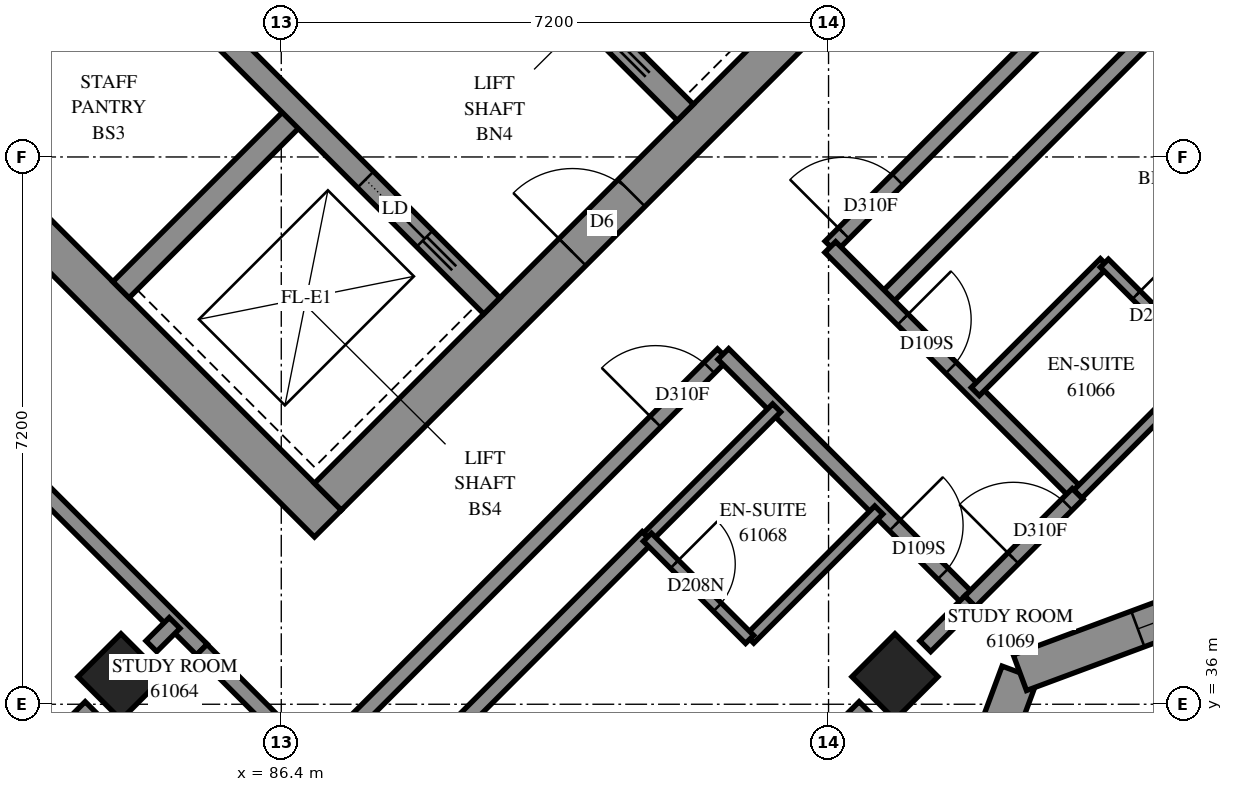
"""IFC4 building model, lengths in metres.
Left out: names, types, materials, properties, quantities, classifications, styles, units other than length and angle.
Written with IfcOpenShell. Run it as: python <this file> out.ifc"""

import sys

from ifc_helpers import new_model, si_unit, direction, frame, frame_2d, origin, origin_2d, place, context, subcontext, project, spatial, polyline, rectangle, outline, extrude, element, fill, save


model = new_model("IFC4")
c1 = context("Model", 3, precision=1e-05, world=origin(), true_north=direction((0.0, 1.0)))
c2 = subcontext(c1, "Body", "Model", "MODEL_VIEW")
j1 = project(units=[si_unit("LENGTHUNIT", "METRE"), si_unit("PLANEANGLEUNIT", "RADIAN")], contexts=[c1])
p1 = place(None, origin())
s1 = spatial("IfcSite", under=j1, at=p1, CompositionType="ELEMENT")
p2 = place(p1, origin())
s2 = spatial("IfcBuilding", under=s1, at=p2, CompositionType="ELEMENT")
p3 = place(p2, frame((0.0, 0.0, 223.6)))
s3 = spatial("IfcBuildingStorey", under=s2, at=p3, CompositionType="ELEMENT", Elevation=223.6)
for number, where, z_axis, x_axis in (
    (1, (84.291, 36.362, 0.0), (0.0, 0.0, 1.0), (0.707, -0.707, 0.0)),
    (2, (94.474, 36.362, 0.0), (0.0, 0.0, 1.0), (0.707, -0.707, 0.0)),
):
    element("IfcColumn", number, at=place(p3, frame(where, z_axis=z_axis, x_axis=x_axis)), inside=s3, PredefinedType="COLUMN", context=c2, shape_type="SweptSolid", body=[
        extrude(rectangle(XDim=0.8, YDim=0.8, at=origin_2d()), origin(), (0.0, 0.0, 1.0), 3.1),
    ])
p4 = place(p3, frame((76.124, 49.267, -0.3), z_axis=(0.0, 0.0, 1.0), x_axis=(0.7071067812, -0.7071067812, 0.0)))
e3 = element("IfcWall", 3, at=p4, inside=s3, PredefinedType="SHEAR", context=c2, shape_type="SweptSolid", body=[
    extrude(rectangle(XDim=15.4, YDim=0.5, at=frame_2d((7.7, 0.0))), origin(), (0.0, 0.0, 1.0), 2.7),
])
p5 = place(p3, frame((87.013, 38.731, -0.3), z_axis=(0.0, 0.0, 1.0), x_axis=(0.7071067812, 0.7071067812, 0.0)))
e4 = element("IfcWall", 4, at=p5, inside=s3, PredefinedType="SHEAR", context=c2, shape_type="SweptSolid", body=[
    extrude(rectangle(XDim=14.4, YDim=0.5, at=frame_2d((7.2, 0.0))), origin(), (0.0, 0.0, 1.0), 2.7),
])
p6 = place(p5, frame((4.55, 0.0, 0.3)))
e5 = element("IfcOpeningElement", 5, at=p6, cuts=e4, PredefinedType="OPENING", context=c2, shape_type="SweptSolid", body=[
    extrude(rectangle(XDim=1.1, YDim=2.1, at=frame_2d((0.55, 1.05))), frame((0.0, 0.26, 0.0), z_axis=(0.0, -1.0, 0.0), x_axis=(1.0, 0.0, 0.0)), (0.0, 0.0, 1.0), 0.52),
])
p7 = place(p5, frame((11.35, 0.0, 0.3)))
e6 = element("IfcOpeningElement", 6, at=p7, cuts=e4, PredefinedType="OPENING", context=c2, shape_type="SweptSolid", body=[
    extrude(rectangle(XDim=1.1, YDim=2.1, at=frame_2d((0.55, 1.05))), frame((0.0, 0.26, 0.0), z_axis=(0.0, -1.0, 0.0), x_axis=(1.0, 0.0, 0.0)), (0.0, 0.0, 1.0), 0.52),
])
for number, where, z_axis, x_axis in (
    (7, (81.746, 43.999, 0.0), (0.0, 0.0, 1.0), (0.707, 0.707, 0.0)),
    (8, (84.291, 41.453, 0.0), (0.0, 0.0, 1.0), (0.707, 0.707, 0.0)),
):
    element("IfcWall", number, at=place(p3, frame(where, z_axis=z_axis, x_axis=x_axis)), inside=s3, PredefinedType="SOLIDWALL", context=c2, shape_type="SweptSolid", body=[
        extrude(rectangle(XDim=3.3, YDim=0.3, at=frame_2d((1.65, 0.0))), origin(), (0.0, 0.0, 1.0), 3.1),
    ])
p8 = place(p3, frame((78.988, 51.423, 0.0), z_axis=(0.0, 0.0, 1.0), x_axis=(0.7071067812, -0.7071067812, 0.0)))
e9 = element("IfcWall", 9, at=p8, inside=s3, PredefinedType="SOLIDWALL", context=c2, shape_type="SweptSolid", body=[
    extrude(rectangle(XDim=14.4, YDim=0.3, at=frame_2d((7.2, 0.0))), origin(), (0.0, 0.0, 1.0), 3.1),
])
p9 = place(p8, frame((1.35, 0.0, 0.0)))
e10 = element("IfcOpeningElement", 10, at=p9, cuts=e9, PredefinedType="OPENING", context=c2, shape_type="SweptSolid", body=[
    extrude(rectangle(XDim=0.9, YDim=2.1, at=frame_2d((0.45, 1.05))), frame((0.0, 0.16, 0.0), z_axis=(0.0, -1.0, 0.0), x_axis=(1.0, 0.0, 0.0)), (0.0, 0.0, 1.0), 0.32),
])
p10 = place(p8, frame((4.95, 0.0, 0.0)))
e11 = element("IfcOpeningElement", 11, at=p10, cuts=e9, PredefinedType="OPENING", context=c2, shape_type="SweptSolid", body=[
    extrude(rectangle(XDim=0.9, YDim=2.1, at=frame_2d((0.45, 1.05))), frame((0.0, 0.16, 0.0), z_axis=(0.0, -1.0, 0.0), x_axis=(1.0, 0.0, 0.0)), (0.0, 0.0, 1.0), 0.32),
])
p11 = place(p8, frame((8.55, 0.0, 0.0)))
e12 = element("IfcOpeningElement", 12, at=p11, cuts=e9, PredefinedType="OPENING", context=c2, shape_type="SweptSolid", body=[
    extrude(rectangle(XDim=0.9, YDim=2.1, at=frame_2d((0.45, 1.05))), frame((0.0, 0.16, 0.0), z_axis=(0.0, -1.0, 0.0), x_axis=(1.0, 0.0, 0.0)), (0.0, 0.0, 1.0), 0.32),
])
p12 = place(p8, frame((12.05, 0.0, 0.0)))
e13 = element("IfcOpeningElement", 13, at=p12, cuts=e9, PredefinedType="OPENING", context=c2, shape_type="SweptSolid", body=[
    extrude(rectangle(XDim=1.1, YDim=2.1, at=frame_2d((0.55, 1.05))), frame((0.0, 0.16, 0.0), z_axis=(0.0, -1.0, 0.0), x_axis=(1.0, 0.0, 0.0)), (0.0, 0.0, 1.0), 0.32),
])
p13 = place(p3, frame((81.534, 53.969, 0.0), z_axis=(0.0, 0.0, 1.0), x_axis=(0.707103309, -0.7071102534, 0.0)))
e14 = element("IfcWall", 14, at=p13, inside=s3, PredefinedType="SOLIDWALL", context=c2, shape_type="SweptSolid", body=[
    extrude(rectangle(XDim=14.4, YDim=0.3, at=frame_2d((7.2, 0.0))), origin(), (0.0, 0.0, 1.0), 3.1),
])
p14 = place(p13, frame((1.25, 0.0, 0.0)))
e15 = element("IfcOpeningElement", 15, at=p14, cuts=e14, PredefinedType="OPENING", context=c2, shape_type="SweptSolid", body=[
    extrude(rectangle(XDim=1.1, YDim=2.1, at=frame_2d((0.55, 1.05))), frame((0.0, 0.16, 0.0), z_axis=(0.0, -1.0, 0.0), x_axis=(1.0, 0.0, 0.0)), (0.0, 0.0, 1.0), 0.32),
])
p15 = place(p13, frame((4.85, 0.0, 0.0)))
e16 = element("IfcOpeningElement", 16, at=p15, cuts=e14, PredefinedType="OPENING", context=c2, shape_type="SweptSolid", body=[
    extrude(rectangle(XDim=1.1, YDim=2.1, at=frame_2d((0.55, 1.05))), frame((0.0, 0.16, 0.0), z_axis=(0.0, -1.0, 0.0), x_axis=(1.0, 0.0, 0.0)), (0.0, 0.0, 1.0), 0.32),
])
p16 = place(p13, frame((8.45, 0.0, 0.0)))
e17 = element("IfcOpeningElement", 17, at=p16, cuts=e14, PredefinedType="OPENING", context=c2, shape_type="SweptSolid", body=[
    extrude(rectangle(XDim=1.1, YDim=2.1, at=frame_2d((0.55, 1.05))), frame((0.0, 0.16, 0.0), z_axis=(0.0, -1.0, 0.0), x_axis=(1.0, 0.0, 0.0)), (0.0, 0.0, 1.0), 0.32),
])
p17 = place(p13, frame((12.05, 0.0, 0.0)))
e18 = element("IfcOpeningElement", 18, at=p17, cuts=e14, PredefinedType="OPENING", context=c2, shape_type="SweptSolid", body=[
    extrude(rectangle(XDim=1.1, YDim=2.1, at=frame_2d((0.55, 1.05))), frame((0.0, 0.16, 0.0), z_axis=(0.0, -1.0, 0.0), x_axis=(1.0, 0.0, 0.0)), (0.0, 0.0, 1.0), 0.32),
])
p18 = place(p3, frame((94.281, 31.47, 0.0), z_axis=(0.0, 0.0, 1.0), x_axis=(0.3481903374, 0.9374238577, 0.0)))
e19 = element("IfcWall", 19, at=p18, inside=s3, PredefinedType="SOLIDWALL", context=c2, shape_type="SweptSolid", body=[
    extrude(outline(polyline([(-0.12, -0.25), (5.16, -0.25), (5.39, 0.25), (0.12, 0.25), (-0.12, -0.25)])), origin(), (0.0, 0.0, 1.0), 3.1),
])
p19 = place(p18, frame((1.512, 0.0, 0.45)))
e20 = element("IfcOpeningElement", 20, at=p19, cuts=e19, PredefinedType="OPENING", context=c2, shape_type="SweptSolid", body=[
    extrude(rectangle(XDim=1.3, YDim=2.5, at=frame_2d((0.65, 1.25))), frame((0.0, 0.26, 0.0), z_axis=(0.0, -1.0, 0.0), x_axis=(1.0, 0.0, 0.0)), (0.0, 0.0, 1.0), 0.52),
])
p20 = place(p18, frame((3.012, 0.0, 0.45)))
e21 = element("IfcOpeningElement", 21, at=p20, cuts=e19, PredefinedType="OPENING", context=c2, shape_type="SweptSolid", body=[
    extrude(rectangle(XDim=1.3, YDim=2.5, at=frame_2d((0.65, 1.25))), frame((0.0, 0.26, 0.0), z_axis=(0.0, -1.0, 0.0), x_axis=(1.0, 0.0, 0.0)), (0.0, 0.0, 1.0), 0.52),
])
p21 = place(p3, frame((96.118, 36.415, 0.0), z_axis=(0.0, 0.0, 1.0), x_axis=(0.9374238577, 0.3481903374, 0.0)))
e22 = element("IfcWall", 22, at=p21, inside=s3, PredefinedType="SOLIDWALL", context=c2, shape_type="SweptSolid", body=[
    extrude(outline(polyline([(0.115, -0.25), (5.395, -0.25), (5.155, 0.25), (-0.115, 0.25), (0.115, -0.25)])), origin(), (0.0, 0.0, 1.0), 3.1),
])
p22 = place(p21, frame((1.655, 0.0, 0.45)))
e23 = element("IfcOpeningElement", 23, at=p22, cuts=e22, PredefinedType="OPENING", context=c2, shape_type="SweptSolid", body=[
    extrude(rectangle(XDim=1.3, YDim=2.5, at=frame_2d((0.65, 1.25))), frame((0.0, 0.26, 0.0), z_axis=(0.0, -1.0, 0.0), x_axis=(1.0, 0.0, 0.0)), (0.0, 0.0, 1.0), 0.52),
])
p23 = place(p21, frame((3.155, 0.0, 0.45)))
e24 = element("IfcOpeningElement", 24, at=p23, cuts=e22, PredefinedType="OPENING", context=c2, shape_type="SweptSolid", body=[
    extrude(rectangle(XDim=1.3, YDim=2.5, at=frame_2d((0.65, 1.25))), frame((0.0, 0.26, 0.0), z_axis=(0.0, -1.0, 0.0), x_axis=(1.0, 0.0, 0.0)), (0.0, 0.0, 1.0), 0.52),
])
p24 = place(p3, frame((79.476, 36.495, 0.0), z_axis=(0.0, 0.0, 1.0), x_axis=(0.9612862254, -0.2755517971, 0.0)))
e25 = element("IfcWall", 25, at=p24, inside=s3, PredefinedType="SOLIDWALL", context=c2, shape_type="SweptSolid", body=[
    extrude(outline(polyline([(-0.145, -0.25), (4.392, -0.25), (4.67, 0.25), (0.145, 0.25), (-0.145, -0.25)])), origin(), (0.0, 0.0, 1.0), 3.1),
])
p25 = place(p24, frame((0.501, 0.0, 0.45)))
e26 = element("IfcOpeningElement", 26, at=p25, cuts=e25, PredefinedType="OPENING", context=c2, shape_type="SweptSolid", body=[
    extrude(rectangle(XDim=1.3, YDim=2.5, at=frame_2d((0.65, 1.25))), frame((0.0, 0.26, 0.0), z_axis=(0.0, -1.0, 0.0), x_axis=(1.0, 0.0, 0.0)), (0.0, 0.0, 1.0), 0.52),
])
p26 = place(p24, frame((2.002, 0.0, 0.45)))
e27 = element("IfcOpeningElement", 27, at=p26, cuts=e25, PredefinedType="OPENING", context=c2, shape_type="SweptSolid", body=[
    extrude(rectangle(XDim=1.3, YDim=2.5, at=frame_2d((0.65, 1.25))), frame((0.0, 0.26, 0.0), z_axis=(0.0, -1.0, 0.0), x_axis=(1.0, 0.0, 0.0)), (0.0, 0.0, 1.0), 0.52),
])
p27 = place(p3, frame((93.625, 42.021, 0.0), z_axis=(0.0, 0.0, 1.0), x_axis=(0.7071067812, 0.7071067812, 0.0)))
e28 = element("IfcWall", 28, at=p27, inside=s3, PredefinedType="PARTITIONING", context=c2, shape_type="SweptSolid", body=[
    extrude(rectangle(XDim=9.998, YDim=0.2, at=frame_2d((4.999, 0.0))), origin(), (0.0, 0.0, 1.0), 3.1),
])
p28 = place(p27, frame((0.248, 0.0, 0.0)))
e29 = element("IfcOpeningElement", 29, at=p28, cuts=e28, PredefinedType="OPENING", context=c2, shape_type="SweptSolid", body=[
    extrude(rectangle(XDim=1.0, YDim=2.1, at=frame_2d((0.5, 1.05))), frame((0.0, 0.11, 0.0), z_axis=(0.0, -1.0, 0.0), x_axis=(1.0, 0.0, 0.0)), (0.0, 0.0, 1.0), 0.22),
])
p29 = place(p3, frame((85.021, 32.002, 0.0), z_axis=(0.0, 0.0, 1.0), x_axis=(0.7071010771, 0.7071124852, 0.0)))
e30 = element("IfcWall", 30, at=p29, inside=s3, PredefinedType="PARTITIONING", context=c2, shape_type="SweptSolid", body=[
    extrude(rectangle(XDim=8.766, YDim=0.2, at=frame_2d((4.383, 0.0))), origin(), (0.0, 0.0, 1.0), 3.1),
])
p30 = place(p3, frame((86.835, 35.231, 0.0), z_axis=(0.0, 0.0, 1.0), x_axis=(0.7071067812, 0.7071067812, 0.0)))
e31 = element("IfcWall", 31, at=p30, inside=s3, PredefinedType="PARTITIONING", context=c2, shape_type="SweptSolid", body=[
    extrude(rectangle(XDim=7.6, YDim=0.2, at=frame_2d((3.8, 0.0))), origin(), (0.0, 0.0, 1.0), 3.1),
])
p31 = place(p30, frame((6.346, 0.0, 0.0)))
e32 = element("IfcOpeningElement", 32, at=p31, cuts=e31, PredefinedType="OPENING", context=c2, shape_type="SweptSolid", body=[
    extrude(rectangle(XDim=1.0, YDim=2.1, at=frame_2d((0.5, 1.05))), frame((0.0, 0.11, 0.0), z_axis=(0.0, -1.0, 0.0), x_axis=(1.0, 0.0, 0.0)), (0.0, 0.0, 1.0), 0.22),
])
p32 = place(p3, frame((94.331, 41.313, 0.0), z_axis=(0.0, 0.0, 1.0), x_axis=(0.7072516979, 0.7069618347, 0.0)))
e33 = element("IfcWall", 33, at=p32, inside=s3, PredefinedType="PARTITIONING", context=c2, shape_type="SweptSolid", body=[
    extrude(rectangle(XDim=6.9, YDim=0.2, at=frame_2d((3.45, 0.0))), origin(), (0.0, 0.0, 1.0), 3.1),
])
p33 = place(p3, frame((80.522, 41.553, 0.0), z_axis=(0.0, 0.0, 1.0), x_axis=(0.7071067812, -0.7071067812, 0.0)))
e34 = element("IfcWall", 34, at=p33, inside=s3, PredefinedType="PARTITIONING", context=c2, shape_type="SweptSolid", body=[
    extrude(rectangle(XDim=6.836, YDim=0.2, at=frame_2d((3.418, 0.0))), origin(), (0.0, 0.0, 1.0), 3.1),
])
p34 = place(p3, frame((89.781, 31.671, 0.0), z_axis=(0.0, 0.0, 1.0), x_axis=(0.7071067812, 0.7071067812, 0.0)))
e35 = element("IfcWall", 35, at=p34, inside=s3, PredefinedType="PARTITIONING", context=c2, shape_type="SweptSolid", body=[
    extrude(rectangle(XDim=6.07, YDim=0.2, at=frame_2d((3.035, 0.0))), origin(), (0.0, 0.0, 1.0), 2.6),
])
p35 = place(p3, frame((93.623, 42.015, 0.0), z_axis=(0.0, 0.0, 1.0), x_axis=(0.7071067812, -0.7071067812, 0.0)))
e36 = element("IfcWall", 36, at=p35, inside=s3, PredefinedType="PARTITIONING", context=c2, shape_type="SweptSolid", body=[
    extrude(rectangle(XDim=4.599, YDim=0.2, at=frame_2d((2.3, 0.0))), origin(), (0.0, 0.0, 1.0), 3.1),
])
p36 = place(p35, frame((1.349, 0.0, 0.0)))
e37 = element("IfcOpeningElement", 37, at=p36, cuts=e36, PredefinedType="OPENING", context=c2, shape_type="SweptSolid", body=[
    extrude(rectangle(XDim=0.9, YDim=2.1, at=frame_2d((0.45, 1.05))), frame((0.0, 0.11, 0.0), z_axis=(0.0, -1.0, 0.0), x_axis=(1.0, 0.0, 0.0)), (0.0, 0.0, 1.0), 0.22),
])
p37 = place(p3, frame((92.216, 40.608, 0.0), z_axis=(0.0, 0.0, 1.0), x_axis=(0.7071067812, -0.7071067812, 0.0)))
e38 = element("IfcWall", 38, at=p37, inside=s3, PredefinedType="PARTITIONING", context=c2, shape_type="SweptSolid", body=[
    extrude(rectangle(XDim=4.599, YDim=0.2, at=frame_2d((2.3, 0.0))), origin(), (0.0, 0.0, 1.0), 3.1),
])
p38 = place(p37, frame((3.189, 0.0, 0.0)))
e39 = element("IfcOpeningElement", 39, at=p38, cuts=e38, PredefinedType="OPENING", context=c2, shape_type="SweptSolid", body=[
    extrude(rectangle(XDim=0.9, YDim=2.1, at=frame_2d((0.45, 1.05))), frame((0.0, 0.11, 0.0), z_axis=(0.0, -1.0, 0.0), x_axis=(1.0, 0.0, 0.0)), (0.0, 0.0, 1.0), 0.22),
])
for number, where, z_axis, x_axis in (
    (40, (92.563, 36.857, 0.0), (0.0, 0.0, 1.0), (0.707, 0.707, 0.0)),
    (41, (91.219, 38.201, 0.0), (0.0, 0.0, 1.0), (0.707, 0.707, 0.0)),
):
    element("IfcWall", number, at=place(p3, frame(where, z_axis=z_axis, x_axis=x_axis)), inside=s3, PredefinedType="PARTITIONING", context=c2, shape_type="SweptSolid", body=[
        extrude(rectangle(XDim=2.401, YDim=0.15, at=frame_2d((1.201, 0.0))), origin(), (0.0, 0.0, 1.0), 3.1),
    ])
p39 = place(p3, frame((96.879, 38.764, 0.0), z_axis=(0.0, 0.0, 1.0), x_axis=(0.706689978, 0.7075233388, 0.0)))
e42 = element("IfcWall", 42, at=p39, inside=s3, PredefinedType="PARTITIONING", context=c2, shape_type="SweptSolid", body=[
    extrude(rectangle(XDim=2.4, YDim=0.15, at=frame_2d((1.2, 0.0))), origin(), (0.0, 0.0, 1.0), 2.6),
])
p40 = place(p3, frame((95.531, 40.113, 0.0), z_axis=(0.0, 0.0, 1.0), x_axis=(0.7075233388, 0.706689978, 0.0)))
e43 = element("IfcWall", 43, at=p40, inside=s3, PredefinedType="PARTITIONING", context=c2, shape_type="SweptSolid", body=[
    extrude(rectangle(XDim=2.4, YDim=0.15, at=frame_2d((1.2, 0.0))), origin(), (0.0, 0.0, 1.0), 3.1),
])
p41 = place(p3, frame((85.353, 36.717, 0.0), z_axis=(0.0, 0.0, 1.0), x_axis=(0.7066304548, -0.7075827869, 0.0)))
e44 = element("IfcWall", 44, at=p41, inside=s3, PredefinedType="PARTITIONING", context=c2, shape_type="SweptSolid", body=[
    extrude(rectangle(XDim=2.1, YDim=0.2, at=frame_2d((1.05, 0.0))), origin(), (0.0, 0.0, 1.0), 3.1),
])
p42 = place(p3, frame((95.463, 37.353, 0.0), z_axis=(0.0, 0.0, 1.0), x_axis=(0.7071067812, 0.7071067812, 0.0)))
e45 = element("IfcWall", 45, at=p42, inside=s3, PredefinedType="PARTITIONING", context=c2, shape_type="SweptSolid", body=[
    extrude(rectangle(XDim=2.0, YDim=0.2, at=frame_2d((1.0, 0.0))), origin(), (0.0, 0.0, 1.0), 2.6),
])
p43 = place(p42, frame((0.802, 0.0, 0.0)))
e46 = element("IfcOpeningElement", 46, at=p43, cuts=e45, PredefinedType="OPENING", context=c2, shape_type="SweptSolid", body=[
    extrude(rectangle(XDim=1.0, YDim=2.1, at=frame_2d((0.5, 1.05))), frame((0.0, 0.11, 0.0), z_axis=(0.0, -1.0, 0.0), x_axis=(1.0, 0.0, 0.0)), (0.0, 0.0, 1.0), 0.22),
])
p44 = place(p3, frame((91.217, 38.197, 0.0), z_axis=(0.0, 0.0, 1.0), x_axis=(0.7071067812, -0.7071067812, 0.0)))
e47 = element("IfcWall", 47, at=p44, inside=s3, PredefinedType="PARTITIONING", context=c2, shape_type="SweptSolid", body=[
    extrude(rectangle(XDim=1.901, YDim=0.15, at=frame_2d((0.95, 0.0))), origin(), (0.0, 0.0, 1.0), 3.1),
])
p45 = place(p44, frame((0.502, 0.0, 0.0)))
e48 = element("IfcOpeningElement", 48, at=p45, cuts=e47, PredefinedType="OPENING", context=c2, shape_type="SweptSolid", body=[
    extrude(rectangle(XDim=0.8, YDim=2.1, at=frame_2d((0.4, 1.05))), frame((0.0, 0.085, 0.0), z_axis=(0.0, -1.0, 0.0), x_axis=(1.0, 0.0, 0.0)), (0.0, 0.0, 1.0), 0.17),
])
p46 = place(p3, frame((97.229, 41.803, 0.0), z_axis=(0.0, 0.0, 1.0), x_axis=(0.7071067812, -0.7071067812, 0.0)))
e49 = element("IfcWall", 49, at=p46, inside=s3, PredefinedType="PARTITIONING", context=c2, shape_type="SweptSolid", body=[
    extrude(rectangle(XDim=1.898, YDim=0.15, at=frame_2d((0.949, 0.0))), origin(), (0.0, 0.0, 1.0), 3.1),
])
p47 = place(p46, frame((0.594, 0.0, 0.0)))
e50 = element("IfcOpeningElement", 50, at=p47, cuts=e49, PredefinedType="OPENING", context=c2, shape_type="SweptSolid", body=[
    extrude(rectangle(XDim=0.8, YDim=2.1, at=frame_2d((0.4, 1.05))), frame((0.0, 0.085, 0.0), z_axis=(0.0, -1.0, 0.0), x_axis=(1.0, 0.0, 0.0)), (0.0, 0.0, 1.0), 0.17),
])
p48 = place(p3, frame((94.873, 36.763, 0.0), z_axis=(0.0, 0.0, 1.0), x_axis=(0.7071067812, 0.7071067812, 0.0)))
e51 = element("IfcWall", 51, at=p48, inside=s3, PredefinedType="PARTITIONING", context=c2, shape_type="SweptSolid", body=[
    extrude(rectangle(XDim=0.834, YDim=0.2, at=frame_2d((0.417, 0.0))), origin(), (0.0, 0.0, 1.0), 2.6),
])
p49 = place(p3, frame((83.522, 35.595, 0.0), z_axis=(0.0, 0.0, 1.0), x_axis=(0.7070108438, 0.7072027056, 0.0)))
e52 = element("IfcWall", 52, at=p49, inside=s3, PredefinedType="PARTITIONING", context=c2, shape_type="SweptSolid", body=[
    extrude(rectangle(XDim=0.521, YDim=0.2, at=frame_2d((0.261, 0.0))), origin(), (0.0, 0.0, 1.0), 3.1),
])
p50 = place(p3, frame((84.691, 36.763, 0.0), z_axis=(0.0, 0.0, 1.0), x_axis=(0.7071067812, 0.7071067812, 0.0)))
e53 = element("IfcWall", 53, at=p50, inside=s3, PredefinedType="PARTITIONING", context=c2, shape_type="SweptSolid", body=[
    extrude(rectangle(XDim=0.433, YDim=0.2, at=frame_2d((0.216, 0.0))), origin(), (0.0, 0.0, 1.0), 3.1),
])
p51 = place(p22, origin())
e54 = element("IfcWindow", 54, at=p51, inside=s3, PartitioningType="SINGLE_PANEL", PredefinedType="WINDOW", context=c2, shape_type="SweptSolid", body=[
    extrude(rectangle(XDim=1.3, YDim=2.5, at=frame_2d((0.65, 1.25))), frame((0.0, 0.18, 0.0), z_axis=(0.0, -1.0, 0.0), x_axis=(1.0, 0.0, 0.0)), (0.0, 0.0, 1.0), 0.06),
])
fill(e23, e54)
p52 = place(p6, origin())
e55 = element("IfcDoor", 55, at=p52, inside=s3, OperationType="DOUBLE_DOOR_SINGLE_SWING", PredefinedType="DOOR", context=c2, shape_type="SweptSolid", body=[
    extrude(rectangle(XDim=1.1, YDim=2.1, at=frame_2d((0.55, 1.05))), frame((0.0, 0.025, 0.0), z_axis=(0.0, -1.0, 0.0), x_axis=(1.0, 0.0, 0.0)), (0.0, 0.0, 1.0), 0.05),
])
fill(e5, e55)
p53 = place(p12, origin())
e56 = element("IfcDoor", 56, at=p53, inside=s3, OperationType="SLIDING_TO_RIGHT", PredefinedType="DOOR", context=c2, shape_type="SweptSolid", body=[
    extrude(rectangle(XDim=1.1, YDim=2.1, at=frame_2d((0.55, 1.05))), frame((0.0, 0.025, 0.0), z_axis=(0.0, -1.0, 0.0), x_axis=(1.0, 0.0, 0.0)), (0.0, 0.0, 1.0), 0.05),
])
fill(e13, e56)
p54 = place(p28, origin())
e57 = element("IfcDoor", 57, at=p54, inside=s3, OperationType="SINGLE_SWING_LEFT", PredefinedType="DOOR", context=c2, shape_type="SweptSolid", body=[
    extrude(rectangle(XDim=1.0, YDim=2.1, at=frame_2d((0.5, 1.05))), frame((0.0, 0.025, 0.0), z_axis=(0.0, -1.0, 0.0), x_axis=(1.0, 0.0, 0.0)), (0.0, 0.0, 1.0), 0.05),
])
fill(e29, e57)
p55 = place(p31, origin())
e58 = element("IfcDoor", 58, at=p55, inside=s3, OperationType="SINGLE_SWING_RIGHT", PredefinedType="DOOR", context=c2, shape_type="SweptSolid", body=[
    extrude(rectangle(XDim=1.0, YDim=2.1, at=frame_2d((0.5, 1.05))), frame((0.0, 0.025, 0.0), z_axis=(0.0, -1.0, 0.0), x_axis=(1.0, 0.0, 0.0)), (0.0, 0.0, 1.0), 0.05),
])
fill(e32, e58)
p56 = place(p36, origin())
e59 = element("IfcDoor", 59, at=p56, inside=s3, OperationType="SINGLE_SWING_RIGHT", PredefinedType="DOOR", context=c2, shape_type="SweptSolid", body=[
    extrude(rectangle(XDim=0.9, YDim=2.1, at=frame_2d((0.45, 1.05))), frame((0.0, 0.025, 0.0), z_axis=(0.0, -1.0, 0.0), x_axis=(1.0, 0.0, 0.0)), (0.0, 0.0, 1.0), 0.05),
])
fill(e37, e59)
p57 = place(p47, origin())
e60 = element("IfcDoor", 60, at=p57, inside=s3, OperationType="SINGLE_SWING_RIGHT", PredefinedType="DOOR", context=c2, shape_type="SweptSolid", body=[
    extrude(rectangle(XDim=0.8, YDim=2.1, at=frame_2d((0.4, 1.05))), frame((0.0, 0.025, 0.0), z_axis=(0.0, -1.0, 0.0), x_axis=(1.0, 0.0, 0.0)), (0.0, 0.0, 1.0), 0.05),
])
fill(e50, e60)
p58 = place(p38, origin())
e61 = element("IfcDoor", 61, at=p58, inside=s3, OperationType="SINGLE_SWING_LEFT", PredefinedType="DOOR", context=c2, shape_type="SweptSolid", body=[
    extrude(rectangle(XDim=0.9, YDim=2.1, at=frame_2d((0.45, 1.05))), frame((0.0, 0.025, 0.0), z_axis=(0.0, -1.0, 0.0), x_axis=(1.0, 0.0, 0.0)), (0.0, 0.0, 1.0), 0.05),
])
fill(e39, e61)
p59 = place(p45, origin())
e62 = element("IfcDoor", 62, at=p59, inside=s3, OperationType="SINGLE_SWING_RIGHT", PredefinedType="DOOR", context=c2, shape_type="SweptSolid", body=[
    extrude(rectangle(XDim=0.8, YDim=2.1, at=frame_2d((0.4, 1.05))), frame((0.0, 0.025, 0.0), z_axis=(0.0, -1.0, 0.0), x_axis=(1.0, 0.0, 0.0)), (0.0, 0.0, 1.0), 0.05),
])
fill(e48, e62)
p60 = place(p43, origin())
e63 = element("IfcDoor", 63, at=p60, inside=s3, OperationType="SINGLE_SWING_RIGHT", PredefinedType="DOOR", context=c2, shape_type="SweptSolid", body=[
    extrude(rectangle(XDim=1.0, YDim=2.1, at=frame_2d((0.5, 1.05))), frame((0.0, 0.025, 0.0), z_axis=(0.0, -1.0, 0.0), x_axis=(1.0, 0.0, 0.0)), (0.0, 0.0, 1.0), 0.05),
])
fill(e46, e63)
save(model, sys.argv[1])
